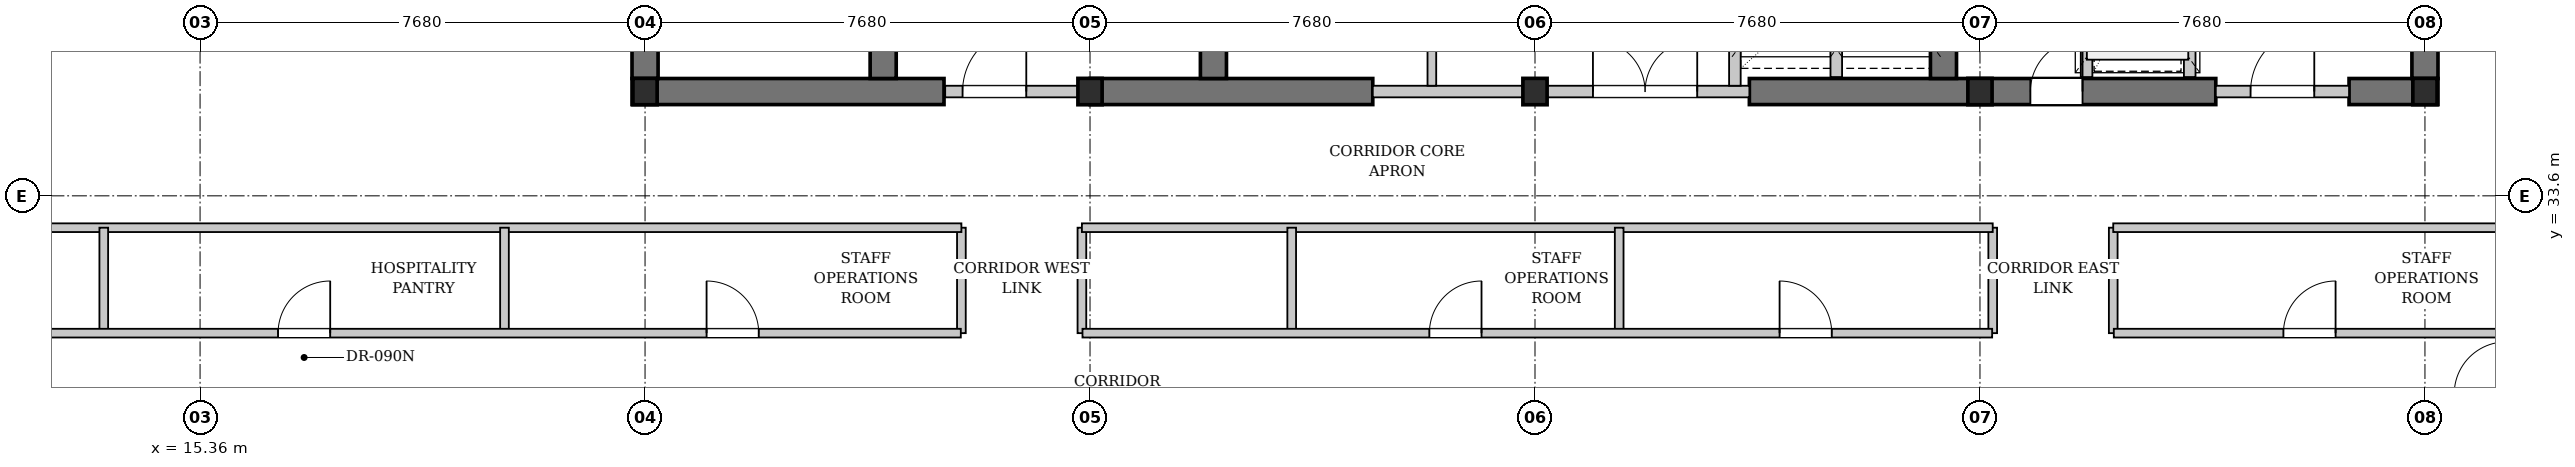
"""IFC4 building model, lengths in metres.
Left out: names, types, materials, properties, quantities, classifications, styles, units other than length and angle.
Written with IfcOpenShell. Run it as: python <this file> out.ifc"""

import sys

from ifc_helpers import new_model, si_unit, direction, frame, frame_2d, origin, origin_2d, place, context, subcontext, project, spatial, rectangle, i_section, extrude, element, fill, save


model = new_model("IFC4")
c1 = context("Model", 3, precision=1e-05, world=origin(), true_north=direction((0.0, 1.0)))
c2 = subcontext(c1, "Body", "Model", "MODEL_VIEW")
j1 = project(units=[si_unit("LENGTHUNIT", "METRE"), si_unit("PLANEANGLEUNIT", "RADIAN")], contexts=[c1])
p1 = place(None, origin())
s1 = spatial("IfcSite", under=j1, at=p1, CompositionType="ELEMENT")
p2 = place(p1, origin())
s2 = spatial("IfcBuilding", under=s1, at=p2, CompositionType="ELEMENT")
p3 = place(p2, frame((0.0, 0.0, 178.7)))
s3 = spatial("IfcBuildingStorey", under=s2, at=p3, CompositionType="ELEMENT", Elevation=178.7)
p4 = place(p3, frame((22.815, 35.4, 0.0), z_axis=(0.0, 0.0, 1.0), x_axis=(1.0, 0.0, 0.0)))
e1 = element("IfcWall", 1, at=p4, inside=s3, PredefinedType="SHEAR", context=c2, shape_type="SweptSolid", body=[
    extrude(rectangle(XDim=5.385, YDim=0.45, at=frame_2d((2.692, 0.0))), origin(), (0.0, 0.0, 1.0), 3.08),
])
p5 = place(p3, frame((30.72, 35.4, 0.0), z_axis=(0.0, 0.0, 1.0), x_axis=(1.0, 0.0, 0.0)))
e2 = element("IfcWall", 2, at=p5, inside=s3, PredefinedType="SHEAR", context=c2, shape_type="SweptSolid", body=[
    extrude(rectangle(XDim=4.88, YDim=0.45, at=frame_2d((2.44, 0.0))), origin(), (0.0, 0.0, 1.0), 3.08),
])
p6 = place(p3, frame((42.1, 35.4, 0.0), z_axis=(0.0, 0.0, 1.0), x_axis=(1.0, 0.0, 0.0)))
e3 = element("IfcWall", 3, at=p6, inside=s3, PredefinedType="SHEAR", context=c2, shape_type="SweptSolid", body=[
    extrude(rectangle(XDim=8.05, YDim=0.45, at=frame_2d((4.025, 0.0))), origin(), (0.0, 0.0, 1.0), 3.08),
])
p7 = place(p6, frame((4.85, 0.0, 0.0)))
e4 = element("IfcOpeningElement", 4, at=p7, cuts=e3, PredefinedType="OPENING", context=c2, shape_type="SweptSolid", body=[
    extrude(rectangle(XDim=0.9, YDim=2.15, at=frame_2d((0.45, 1.075))), frame((0.0, 0.235, 0.0), z_axis=(0.0, -1.0, 0.0), x_axis=(1.0, 0.0, 0.0)), (0.0, 0.0, 1.0), 0.47),
])
p8 = place(p3, frame((52.45, 35.4, 0.0), z_axis=(0.0, 0.0, 1.0), x_axis=(1.0, 0.0, 0.0)))
e5 = element("IfcWall", 5, at=p8, inside=s3, PredefinedType="SHEAR", context=c2, shape_type="SweptSolid", body=[
    extrude(rectangle(XDim=1.535, YDim=0.45, at=frame_2d((0.768, 0.0))), origin(), (0.0, 0.0, 1.0), 3.08),
])
p9 = place(p3, frame((23.04, 35.625, 0.0), z_axis=(0.0, 0.0, 1.0), x_axis=(0.0, 1.0, 0.0)))
e6 = element("IfcWall", 6, at=p9, inside=s3, PredefinedType="SHEAR", context=c2, shape_type="SweptSolid", body=[
    extrude(rectangle(XDim=10.35, YDim=0.45, at=frame_2d((5.175, 0.0))), origin(), (0.0, 0.0, 1.0), 3.08),
])
p10 = place(p3, frame((27.15, 35.625, 0.0), z_axis=(0.0, 0.0, 1.0), x_axis=(0.0, 1.0, 0.0)))
e7 = element("IfcWall", 7, at=p10, inside=s3, PredefinedType="SHEAR", context=c2, shape_type="SweptSolid", body=[
    extrude(rectangle(XDim=10.35, YDim=0.45, at=frame_2d((5.175, 0.0))), origin(), (0.0, 0.0, 1.0), 3.08),
])
p11 = place(p10, frame((0.675, 0.0, 0.0)))
e8 = element("IfcOpeningElement", 8, at=p11, cuts=e7, PredefinedType="OPENING", context=c2, shape_type="SweptSolid", body=[
    extrude(rectangle(XDim=1.1, YDim=2.15, at=frame_2d((0.55, 1.075))), frame((0.0, 0.235, 0.0), z_axis=(0.0, -1.0, 0.0), x_axis=(1.0, 0.0, 0.0)), (0.0, 0.0, 1.0), 0.47),
])
for number, where, z_axis, x_axis in (
    (9, (32.85, 35.625, 0.0), (0.0, 0.0, 1.0), (0.0, 1.0, 0.0)),
    (10, (45.45, 35.625, 0.0), (0.0, 0.0, 1.0), (0.0, 1.0, 0.0)),
    (11, (53.76, 35.625, 0.0), (0.0, 0.0, 1.0), (0.0, 1.0, 0.0)),
):
    element("IfcWall", number, at=place(p3, frame(where, z_axis=z_axis, x_axis=x_axis)), inside=s3, PredefinedType="SHEAR", context=c2, shape_type="SweptSolid", body=[
        extrude(rectangle(XDim=10.35, YDim=0.45, at=frame_2d((5.175, 0.0))), origin(), (0.0, 0.0, 1.0), 3.08),
    ])
for number, where, z_axis, x_axis in (
    (12, (23.04, 35.4, 0.0), (0.0, 0.0, 1.0), (1.0, 0.0, 0.0)),
    (13, (30.72, 35.4, 0.0), (0.0, 0.0, 1.0), (1.0, 0.0, 0.0)),
    (14, (38.4, 35.4, 0.0), (0.0, 0.0, 1.0), (1.0, 0.0, 0.0)),
    (15, (46.08, 35.4, 0.0), (0.0, 0.0, 1.0), (1.0, 0.0, 0.0)),
    (16, (53.76, 35.4, 0.0), (0.0, 0.0, 1.0), (1.0, 0.0, 0.0)),
):
    element("IfcColumn", number, at=place(p3, frame(where, z_axis=z_axis, x_axis=x_axis)), inside=s3, PredefinedType="COLUMN", context=c2, shape_type="SweptSolid", body=[
        extrude(i_section(OverallWidth=0.418, OverallDepth=0.455, WebThickness=0.042, FlangeThickness=0.068, FilletRadius=0.015, at=origin_2d()), origin(), (0.0, 0.0, 1.0), 3.3),
    ])
p12 = place(p3, frame((28.22, 35.4, 0.0), z_axis=(0.0, 0.0, 1.0), x_axis=(1.0, 0.0, 0.0)))
e17 = element("IfcWall", 17, at=p12, inside=s3, PredefinedType="PARTITIONING", context=c2, shape_type="SweptSolid", body=[
    extrude(rectangle(XDim=2.5, YDim=0.2, at=frame_2d((1.25, 0.0))), origin(), (0.0, 0.0, 1.0), 2.475),
])
p13 = place(p12, frame((0.3, 0.0, 0.0)))
e18 = element("IfcOpeningElement", 18, at=p13, cuts=e17, PredefinedType="OPENING", context=c2, shape_type="SweptSolid", body=[
    extrude(rectangle(XDim=1.1, YDim=2.15, at=frame_2d((0.55, 1.075))), frame((0.0, 0.11, 0.0), z_axis=(0.0, -1.0, 0.0), x_axis=(1.0, 0.0, 0.0)), (0.0, 0.0, 1.0), 0.22),
])
p14 = place(p3, frame((35.6, 35.4, 0.0), z_axis=(0.0, 0.0, 1.0), x_axis=(1.0, 0.0, 0.0)))
e19 = element("IfcWall", 19, at=p14, inside=s3, PredefinedType="PARTITIONING", context=c2, shape_type="SweptSolid", body=[
    extrude(rectangle(XDim=6.5, YDim=0.2, at=frame_2d((3.25, 0.0))), origin(), (0.0, 0.0, 1.0), 2.475),
])
p15 = place(p14, frame((3.8, 0.0, 0.0)))
e20 = element("IfcOpeningElement", 20, at=p15, cuts=e19, PredefinedType="OPENING", context=c2, shape_type="SweptSolid", body=[
    extrude(rectangle(XDim=1.8, YDim=2.3, at=frame_2d((0.9, 1.15))), frame((0.0, 0.11, 0.0), z_axis=(0.0, -1.0, 0.0), x_axis=(1.0, 0.0, 0.0)), (0.0, 0.0, 1.0), 0.22),
])
p16 = place(p3, frame((36.62, 35.5, 0.0), z_axis=(0.0, 0.0, 1.0), x_axis=(0.0, 1.0, 0.0)))
e21 = element("IfcWall", 21, at=p16, inside=s3, PredefinedType="PARTITIONING", context=c2, shape_type="SweptSolid", body=[
    extrude(rectangle(XDim=10.42, YDim=0.15, at=frame_2d((5.21, 0.0))), origin(), (0.0, 0.0, 1.0), 3.08),
])
p17 = place(p16, frame((3.92, 0.0, 0.0)))
e22 = element("IfcOpeningElement", 22, at=p17, cuts=e21, PredefinedType="OPENING", context=c2, shape_type="SweptSolid", body=[
    extrude(rectangle(XDim=0.9, YDim=2.15, at=frame_2d((0.45, 1.075))), frame((0.0, 0.085, 0.0), z_axis=(0.0, -1.0, 0.0), x_axis=(1.0, 0.0, 0.0)), (0.0, 0.0, 1.0), 0.17),
])
p18 = place(p16, frame((5.85, 0.0, 0.0)))
e23 = element("IfcOpeningElement", 23, at=p18, cuts=e21, PredefinedType="OPENING", context=c2, shape_type="SweptSolid", body=[
    extrude(rectangle(XDim=0.9, YDim=2.15, at=frame_2d((0.45, 1.075))), frame((0.0, 0.085, 0.0), z_axis=(0.0, -1.0, 0.0), x_axis=(1.0, 0.0, 0.0)), (0.0, 0.0, 1.0), 0.17),
])
p19 = place(p3, frame((43.6, 35.65, 0.0), z_axis=(0.0, 0.0, 1.0), x_axis=(0.0, 1.0, 0.0)))
e24 = element("IfcWall", 24, at=p19, inside=s3, PredefinedType="PARTITIONING", context=c2, shape_type="SweptSolid", body=[
    extrude(rectangle(XDim=3.25, YDim=0.2, at=frame_2d((1.625, 0.0))), origin(), (0.0, 0.0, 1.0), 3.08),
])
p20 = place(p3, frame((41.85, 35.5, 0.0), z_axis=(0.0, 0.0, 1.0), x_axis=(0.0, 1.0, 0.0)))
e25 = element("IfcWall", 25, at=p20, inside=s3, PredefinedType="PARTITIONING", context=c2, shape_type="SweptSolid", body=[
    extrude(rectangle(XDim=3.4, YDim=0.2, at=frame_2d((1.7, 0.0))), origin(), (0.0, 0.0, 1.0), 3.08),
])
p21 = place(p3, frame((50.15, 35.4, 0.0), z_axis=(0.0, 0.0, 1.0), x_axis=(1.0, 0.0, 0.0)))
e26 = element("IfcWall", 26, at=p21, inside=s3, PredefinedType="PARTITIONING", context=c2, shape_type="SweptSolid", body=[
    extrude(rectangle(XDim=2.3, YDim=0.2, at=frame_2d((1.15, 0.0))), origin(), (0.0, 0.0, 1.0), 2.475),
])
p22 = place(p21, frame((0.6, 0.0, 0.0)))
e27 = element("IfcOpeningElement", 27, at=p22, cuts=e26, PredefinedType="OPENING", context=c2, shape_type="SweptSolid", body=[
    extrude(rectangle(XDim=1.1, YDim=2.15, at=frame_2d((0.55, 1.075))), frame((0.0, 0.11, 0.0), z_axis=(0.0, -1.0, 0.0), x_axis=(1.0, 0.0, 0.0)), (0.0, 0.0, 1.0), 0.22),
])
p23 = place(p3, frame((49.7, 35.65, 0.0), z_axis=(0.0, 0.0, 1.0), x_axis=(0.0, 1.0, 0.0)))
e28 = element("IfcWall", 28, at=p23, inside=s3, PredefinedType="PARTITIONING", context=c2, shape_type="SweptSolid", body=[
    extrude(rectangle(XDim=3.15, YDim=0.2, at=frame_2d((1.575, 0.0))), origin(), (0.0, 0.0, 1.0), 3.08),
])
p24 = place(p23, frame((0.85, 0.0, 0.0)))
e29 = element("IfcOpeningElement", 29, at=p24, cuts=e28, PredefinedType="OPENING", context=c2, shape_type="SweptSolid", body=[
    extrude(rectangle(XDim=1.2, YDim=2.2, at=frame_2d((0.6, 1.1))), frame((0.0, 0.11, 0.0), z_axis=(0.0, -1.0, 0.0), x_axis=(1.0, 0.0, 0.0)), (0.0, 0.0, 1.0), 0.22),
])
p25 = place(p3, frame((47.92, 35.65, 0.0), z_axis=(0.0, 0.0, 1.0), x_axis=(0.0, 1.0, 0.0)))
e30 = element("IfcWall", 30, at=p25, inside=s3, PredefinedType="PARTITIONING", context=c2, shape_type="SweptSolid", body=[
    extrude(rectangle(XDim=3.15, YDim=0.2, at=frame_2d((1.575, 0.0))), origin(), (0.0, 0.0, 1.0), 3.08),
])
p26 = place(p3, frame((28.5, 31.23, 0.0), z_axis=(0.0, 0.0, 1.0), x_axis=(0.0, 1.0, 0.0)))
e31 = element("IfcWall", 31, at=p26, inside=s3, PredefinedType="PARTITIONING", context=c2, shape_type="SweptSolid", body=[
    extrude(rectangle(XDim=1.82, YDim=0.15, at=frame_2d((0.91, 0.0))), origin(), (0.0, 0.0, 1.0), 3.08),
])
for number, where, z_axis, x_axis in (
    (32, (30.58, 31.23, 0.0), (0.0, 0.0, 1.0), (0.0, 1.0, 0.0)),
    (33, (46.3, 31.23, 0.0), (0.0, 0.0, 1.0), (0.0, 1.0, 0.0)),
):
    element("IfcWall", number, at=place(p3, frame(where, z_axis=z_axis, x_axis=x_axis)), inside=s3, PredefinedType="PARTITIONING", context=c2, shape_type="SweptSolid", body=[
        extrude(rectangle(XDim=1.82, YDim=0.15, at=frame_2d((0.91, 0.0))), origin(), (0.0, 0.0, 1.0), 2.475),
    ])
p27 = place(p3, frame((48.38, 31.23, 0.0), z_axis=(0.0, 0.0, 1.0), x_axis=(0.0, 1.0, 0.0)))
e34 = element("IfcWall", 34, at=p27, inside=s3, PredefinedType="PARTITIONING", context=c2, shape_type="SweptSolid", body=[
    extrude(rectangle(XDim=1.82, YDim=0.15, at=frame_2d((0.91, 0.0))), origin(), (0.0, 0.0, 1.0), 3.08),
])
p28 = place(p3, frame((9.26, 33.05, 0.0), z_axis=(0.0, 0.0, 1.0), x_axis=(1.0, 0.0, 0.0)))
e35 = element("IfcWall", 35, at=p28, inside=s3, PredefinedType="PARTITIONING", context=c2, shape_type="SweptSolid", body=[
    extrude(rectangle(XDim=19.24, YDim=0.15, at=frame_2d((9.62, 0.0))), origin(), (0.0, 0.0, 1.0), 2.475),
])
p29 = place(p3, frame((30.58, 33.05, 0.0), z_axis=(0.0, 0.0, 1.0), x_axis=(1.0, 0.0, 0.0)))
e36 = element("IfcWall", 36, at=p29, inside=s3, PredefinedType="PARTITIONING", context=c2, shape_type="SweptSolid", body=[
    extrude(rectangle(XDim=15.72, YDim=0.15, at=frame_2d((7.86, 0.0))), origin(), (0.0, 0.0, 1.0), 3.08),
])
p30 = place(p3, frame((48.38, 33.05, 0.0), z_axis=(0.0, 0.0, 1.0), x_axis=(1.0, 0.0, 0.0)))
e37 = element("IfcWall", 37, at=p30, inside=s3, PredefinedType="PARTITIONING", context=c2, shape_type="SweptSolid", body=[
    extrude(rectangle(XDim=6.785, YDim=0.15, at=frame_2d((3.393, 0.0))), origin(), (0.0, 0.0, 1.0), 3.08),
])
for number, where, z_axis, x_axis in (
    (38, (13.698, 31.23, 0.0), (0.0, 0.0, 1.0), (0.0, 1.0, 0.0)),
    (39, (20.614, 31.23, 0.0), (0.0, 0.0, 1.0), (0.0, 1.0, 0.0)),
):
    element("IfcWall", number, at=place(p3, frame(where, z_axis=z_axis, x_axis=x_axis)), inside=s3, PredefinedType="PARTITIONING", context=c2, shape_type="SweptSolid", body=[
        extrude(rectangle(XDim=1.82, YDim=0.15, at=frame_2d((0.91, 0.0))), origin(), (0.0, 0.0, 1.0), 3.08),
    ])
p31 = place(p3, frame((9.28, 31.23, 0.0), z_axis=(0.0, 0.0, 1.0), x_axis=(1.0, 0.0, 0.0)))
e40 = element("IfcWall", 40, at=p31, inside=s3, PredefinedType="PARTITIONING", context=c2, shape_type="SweptSolid", body=[
    extrude(rectangle(XDim=19.21, YDim=0.15, at=frame_2d((9.605, 0.0))), origin(), (0.0, 0.0, 1.0), 2.475),
])
p32 = place(p31, frame((7.426, 0.0, 0.0)))
e41 = element("IfcOpeningElement", 41, at=p32, cuts=e40, PredefinedType="OPENING", context=c2, shape_type="SweptSolid", body=[
    extrude(rectangle(XDim=0.9, YDim=2.15, at=frame_2d((0.45, 1.075))), frame((0.0, 0.085, 0.0), z_axis=(0.0, -1.0, 0.0), x_axis=(1.0, 0.0, 0.0)), (0.0, 0.0, 1.0), 0.17),
])
p33 = place(p31, frame((14.822, 0.0, 0.0)))
e42 = element("IfcOpeningElement", 42, at=p33, cuts=e40, PredefinedType="OPENING", context=c2, shape_type="SweptSolid", body=[
    extrude(rectangle(XDim=0.9, YDim=2.15, at=frame_2d((0.45, 1.075))), frame((0.0, 0.085, 0.0), z_axis=(0.0, -1.0, 0.0), x_axis=(1.0, 0.0, 0.0)), (0.0, 0.0, 1.0), 0.17),
])
for number, where, z_axis, x_axis in (
    (43, (34.201, 31.23, 0.0), (0.0, 0.0, 1.0), (0.0, 1.0, 0.0)),
    (44, (39.853, 31.23, 0.0), (0.0, 0.0, 1.0), (0.0, 1.0, 0.0)),
):
    element("IfcWall", number, at=place(p3, frame(where, z_axis=z_axis, x_axis=x_axis)), inside=s3, PredefinedType="PARTITIONING", context=c2, shape_type="SweptSolid", body=[
        extrude(rectangle(XDim=1.82, YDim=0.15, at=frame_2d((0.91, 0.0))), origin(), (0.0, 0.0, 1.0), 3.08),
    ])
p34 = place(p3, frame((30.59, 31.23, 0.0), z_axis=(0.0, 0.0, 1.0), x_axis=(1.0, 0.0, 0.0)))
e45 = element("IfcWall", 45, at=p34, inside=s3, PredefinedType="PARTITIONING", context=c2, shape_type="SweptSolid", body=[
    extrude(rectangle(XDim=15.7, YDim=0.15, at=frame_2d((7.85, 0.0))), origin(), (0.0, 0.0, 1.0), 3.08),
])
p35 = place(p34, frame((5.987, 0.0, 0.0)))
e46 = element("IfcOpeningElement", 46, at=p35, cuts=e45, PredefinedType="OPENING", context=c2, shape_type="SweptSolid", body=[
    extrude(rectangle(XDim=0.9, YDim=2.15, at=frame_2d((0.45, 1.075))), frame((0.0, 0.085, 0.0), z_axis=(0.0, -1.0, 0.0), x_axis=(1.0, 0.0, 0.0)), (0.0, 0.0, 1.0), 0.17),
])
p36 = place(p34, frame((12.031, 0.0, 0.0)))
e47 = element("IfcOpeningElement", 47, at=p36, cuts=e45, PredefinedType="OPENING", context=c2, shape_type="SweptSolid", body=[
    extrude(rectangle(XDim=0.9, YDim=2.15, at=frame_2d((0.45, 1.075))), frame((0.0, 0.085, 0.0), z_axis=(0.0, -1.0, 0.0), x_axis=(1.0, 0.0, 0.0)), (0.0, 0.0, 1.0), 0.17),
])
p37 = place(p3, frame((48.39, 31.23, 0.0), z_axis=(0.0, 0.0, 1.0), x_axis=(1.0, 0.0, 0.0)))
e48 = element("IfcWall", 48, at=p37, inside=s3, PredefinedType="PARTITIONING", context=c2, shape_type="SweptSolid", body=[
    extrude(rectangle(XDim=6.755, YDim=0.15, at=frame_2d((3.377, 0.0))), origin(), (0.0, 0.0, 1.0), 3.08),
])
p38 = place(p37, frame((2.927, 0.0, 0.0)))
e49 = element("IfcOpeningElement", 49, at=p38, cuts=e48, PredefinedType="OPENING", context=c2, shape_type="SweptSolid", body=[
    extrude(rectangle(XDim=0.9, YDim=2.15, at=frame_2d((0.45, 1.075))), frame((0.0, 0.085, 0.0), z_axis=(0.0, -1.0, 0.0), x_axis=(1.0, 0.0, 0.0)), (0.0, 0.0, 1.0), 0.17),
])
p39 = place(p13, origin())
e50 = element("IfcDoor", 50, at=p39, inside=s3, OperationType="SINGLE_SWING_RIGHT", PredefinedType="DOOR", context=c2, shape_type="SweptSolid", body=[
    extrude(rectangle(XDim=1.1, YDim=2.15, at=frame_2d((0.55, 1.075))), frame((0.0, 0.025, 0.0), z_axis=(0.0, -1.0, 0.0), x_axis=(1.0, 0.0, 0.0)), (0.0, 0.0, 1.0), 0.05),
])
fill(e18, e50)
p40 = place(p15, origin())
e51 = element("IfcDoor", 51, at=p40, inside=s3, OperationType="DOUBLE_DOOR_SINGLE_SWING", PredefinedType="DOOR", context=c2, shape_type="SweptSolid", body=[
    extrude(rectangle(XDim=1.8, YDim=2.3, at=frame_2d((0.9, 1.15))), frame((0.0, 0.025, 0.0), z_axis=(0.0, -1.0, 0.0), x_axis=(1.0, 0.0, 0.0)), (0.0, 0.0, 1.0), 0.05),
])
fill(e20, e51)
p41 = place(p22, origin())
e52 = element("IfcDoor", 52, at=p41, inside=s3, OperationType="SINGLE_SWING_RIGHT", PredefinedType="DOOR", context=c2, shape_type="SweptSolid", body=[
    extrude(rectangle(XDim=1.1, YDim=2.15, at=frame_2d((0.55, 1.075))), frame((0.0, 0.025, 0.0), z_axis=(0.0, -1.0, 0.0), x_axis=(1.0, 0.0, 0.0)), (0.0, 0.0, 1.0), 0.05),
])
fill(e27, e52)
p42 = place(p32, origin())
e53 = element("IfcDoor", 53, at=p42, inside=s3, OperationType="SINGLE_SWING_RIGHT", PredefinedType="DOOR", context=c2, shape_type="SweptSolid", body=[
    extrude(rectangle(XDim=0.9, YDim=2.15, at=frame_2d((0.45, 1.075))), frame((0.0, 0.025, 0.0), z_axis=(0.0, -1.0, 0.0), x_axis=(1.0, 0.0, 0.0)), (0.0, 0.0, 1.0), 0.05),
])
fill(e41, e53)
p43 = place(p33, origin())
e54 = element("IfcDoor", 54, at=p43, inside=s3, OperationType="SINGLE_SWING_LEFT", PredefinedType="DOOR", context=c2, shape_type="SweptSolid", body=[
    extrude(rectangle(XDim=0.9, YDim=2.15, at=frame_2d((0.45, 1.075))), frame((0.0, 0.025, 0.0), z_axis=(0.0, -1.0, 0.0), x_axis=(1.0, 0.0, 0.0)), (0.0, 0.0, 1.0), 0.05),
])
fill(e42, e54)
p44 = place(p35, origin())
e55 = element("IfcDoor", 55, at=p44, inside=s3, OperationType="SINGLE_SWING_RIGHT", PredefinedType="DOOR", context=c2, shape_type="SweptSolid", body=[
    extrude(rectangle(XDim=0.9, YDim=2.15, at=frame_2d((0.45, 1.075))), frame((0.0, 0.025, 0.0), z_axis=(0.0, -1.0, 0.0), x_axis=(1.0, 0.0, 0.0)), (0.0, 0.0, 1.0), 0.05),
])
fill(e46, e55)
p45 = place(p36, origin())
e56 = element("IfcDoor", 56, at=p45, inside=s3, OperationType="SINGLE_SWING_LEFT", PredefinedType="DOOR", context=c2, shape_type="SweptSolid", body=[
    extrude(rectangle(XDim=0.9, YDim=2.15, at=frame_2d((0.45, 1.075))), frame((0.0, 0.025, 0.0), z_axis=(0.0, -1.0, 0.0), x_axis=(1.0, 0.0, 0.0)), (0.0, 0.0, 1.0), 0.05),
])
fill(e47, e56)
p46 = place(p38, origin())
e57 = element("IfcDoor", 57, at=p46, inside=s3, OperationType="SINGLE_SWING_RIGHT", PredefinedType="DOOR", context=c2, shape_type="SweptSolid", body=[
    extrude(rectangle(XDim=0.9, YDim=2.15, at=frame_2d((0.45, 1.075))), frame((0.0, 0.025, 0.0), z_axis=(0.0, -1.0, 0.0), x_axis=(1.0, 0.0, 0.0)), (0.0, 0.0, 1.0), 0.05),
])
fill(e49, e57)
p47 = place(p7, origin())
e58 = element("IfcDoor", 58, at=p47, inside=s3, OperationType="SINGLE_SWING_RIGHT", PredefinedType="DOOR", context=c2, shape_type="SweptSolid", body=[
    extrude(rectangle(XDim=0.9, YDim=2.15, at=frame_2d((0.45, 1.075))), frame((0.0, 0.025, 0.0), z_axis=(0.0, -1.0, 0.0), x_axis=(1.0, 0.0, 0.0)), (0.0, 0.0, 1.0), 0.05),
])
fill(e4, e58)
save(model, sys.argv[1])
